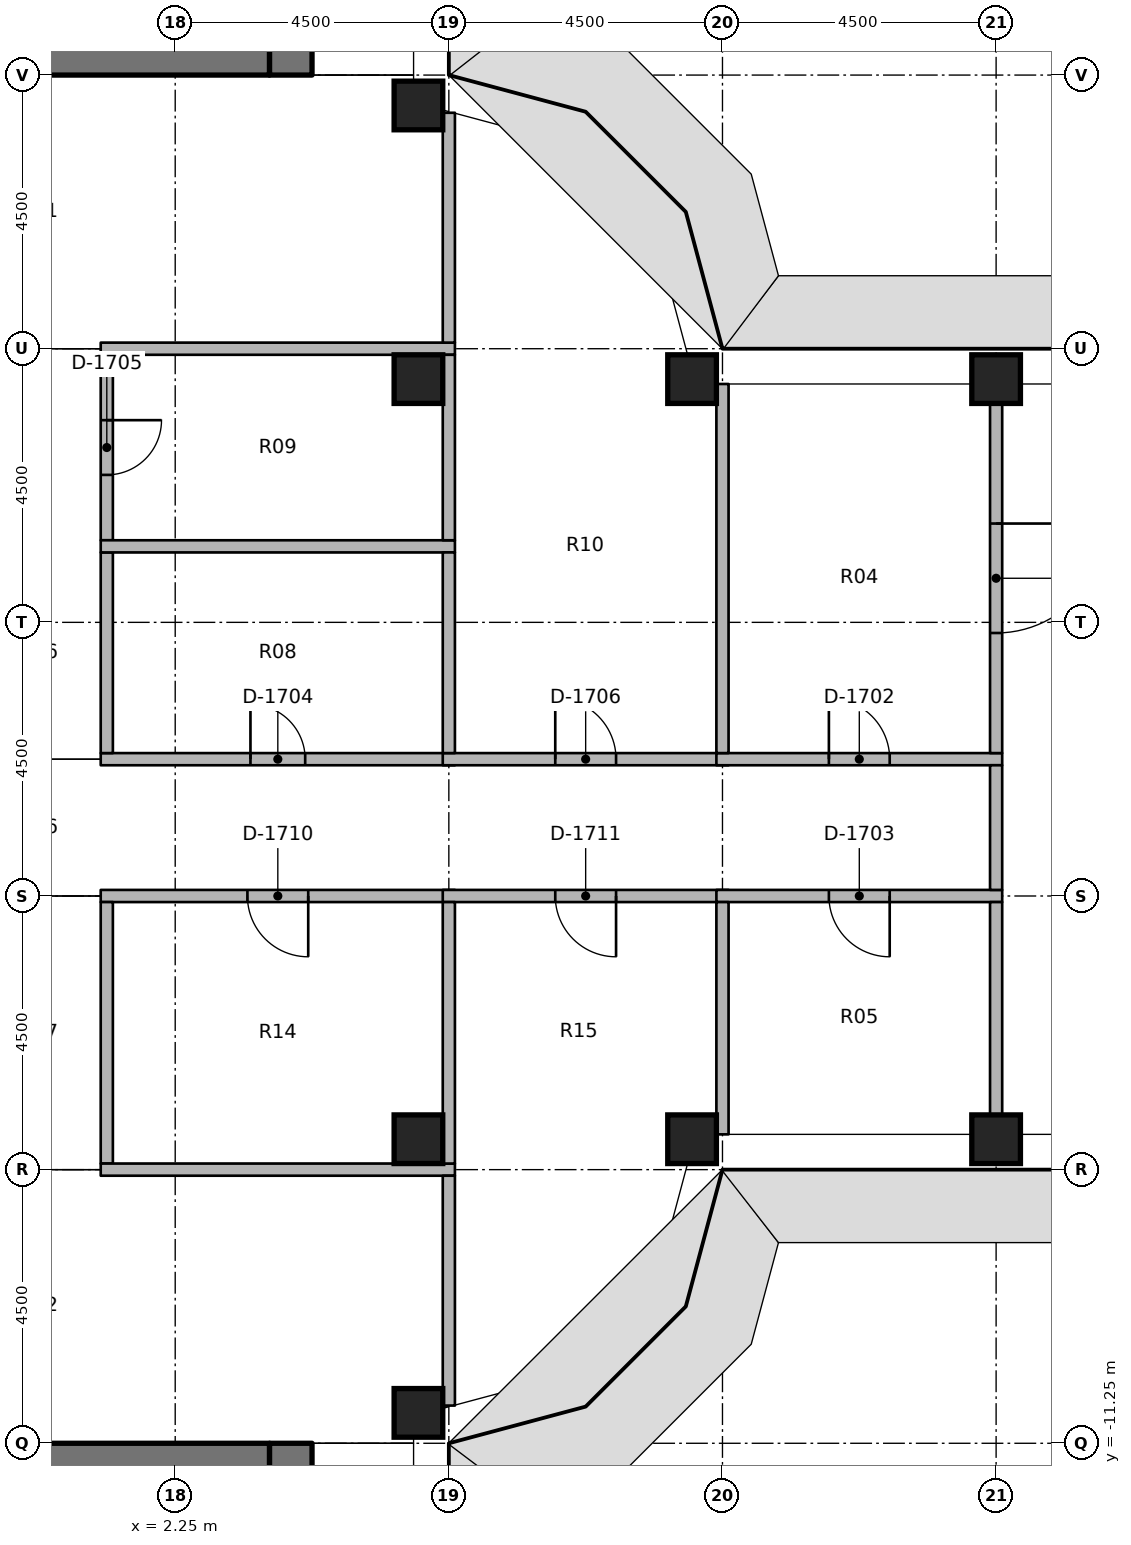
"""IFC4 building model, lengths in metres.
Left out: names, types, materials, properties, quantities, classifications, styles, units other than length and angle.
Written with IfcOpenShell. Run it as: python <this file> out.ifc"""

import sys

from ifc_helpers import new_model, si_unit, direction, frame, frame_2d, origin, origin_2d, place, context, subcontext, project, spatial, rectangle, extrude, element, fill, save


model = new_model("IFC4")
c1 = context("Model", 3, precision=1e-05, world=origin(), true_north=direction((0.0, 1.0)))
c2 = subcontext(c1, "Body", "Model", "MODEL_VIEW")
j1 = project(units=[si_unit("LENGTHUNIT", "METRE"), si_unit("PLANEANGLEUNIT", "RADIAN")], contexts=[c1])
p1 = place(None, origin())
s1 = spatial("IfcSite", under=j1, at=p1, CompositionType="ELEMENT")
p2 = place(p1, origin())
s2 = spatial("IfcBuilding", under=s1, at=p2, CompositionType="ELEMENT")
p3 = place(p2, frame((0.0, 0.0, 160.0)))
s3 = spatial("IfcBuildingStorey", under=s2, at=p3, CompositionType="ELEMENT", Elevation=160.0)
for number, where, z_axis, x_axis in (
    (1, (6.25, -10.75, 0.0), (0.0, 0.0, 1.0), (1.0, 0.0, 0.0)),
    (2, (6.25, -6.25, 0.0), (0.0, 0.0, 1.0), (1.0, 0.0, 0.0)),
    (3, (6.25, 6.25, 0.0), (0.0, 0.0, 1.0), (1.0, 0.0, 0.0)),
    (4, (6.25, 10.75, 0.0), (0.0, 0.0, 1.0), (1.0, 0.0, 0.0)),
    (5, (10.75, -6.25, 0.0), (0.0, 0.0, 1.0), (1.0, 0.0, 0.0)),
    (6, (10.75, 6.25, 0.0), (0.0, 0.0, 1.0), (1.0, 0.0, 0.0)),
    (7, (15.75, -6.25, 0.0), (0.0, 0.0, 1.0), (1.0, 0.0, 0.0)),
    (8, (15.75, 6.25, 0.0), (0.0, 0.0, 1.0), (1.0, 0.0, 0.0)),
):
    element("IfcColumn", number, at=place(p3, frame(where, z_axis=z_axis, x_axis=x_axis)), inside=s3, PredefinedType="COLUMN", context=c2, shape_type="SweptSolid", body=[
        extrude(rectangle(XDim=0.8, YDim=0.8, at=origin_2d()), origin(), (0.0, 0.0, 1.0), 3.65),
    ])
p4 = place(p3, frame((4.15, 11.25, 0.0), z_axis=(0.0, 0.0, 1.0), x_axis=(0.0, 1.0, 0.0)))
e9 = element("IfcWall", 9, at=p4, inside=s3, PredefinedType="SHEAR", context=c2, shape_type="SweptSolid", body=[
    extrude(rectangle(XDim=15.0, YDim=0.7, at=frame_2d((7.5, 0.0))), origin(), (0.0, 0.0, 1.0), 3.8),
])
p5 = place(p4, frame((7.15, 0.0, 0.0)))
e10 = element("IfcOpeningElement", 10, at=p5, cuts=e9, PredefinedType="OPENING", context=c2, shape_type="SweptSolid", body=[
    extrude(rectangle(XDim=1.5, YDim=2.3, at=frame_2d((0.75, 1.15))), frame((0.0, 0.36, 0.0), z_axis=(0.0, -1.0, 0.0), x_axis=(1.0, 0.0, 0.0)), (0.0, 0.0, 1.0), 0.72),
])
p6 = place(p4, frame((5.55, 0.0, 0.0)))
e11 = element("IfcOpeningElement", 11, at=p6, cuts=e9, PredefinedType="OPENING", context=c2, shape_type="SweptSolid", body=[
    extrude(rectangle(XDim=1.2, YDim=2.1, at=frame_2d((0.6, 1.05))), frame((0.0, 0.36, 0.0), z_axis=(0.0, -1.0, 0.0), x_axis=(1.0, 0.0, 0.0)), (0.0, 0.0, 1.0), 0.72),
])
p7 = place(p3, frame((-3.8, 11.6, 0.0), z_axis=(0.0, 0.0, 1.0), x_axis=(1.0, 0.0, 0.0)))
e12 = element("IfcWall", 12, at=p7, inside=s3, PredefinedType="SHEAR", context=c2, shape_type="SweptSolid", body=[
    extrude(rectangle(XDim=7.6, YDim=0.7, at=frame_2d((3.8, 0.0))), origin(), (0.0, 0.0, 1.0), 3.8),
])
p8 = place(p3, frame((4.15, -11.25, 0.0), z_axis=(0.0, 0.0, 1.0), x_axis=(0.0, -1.0, 0.0)))
e13 = element("IfcWall", 13, at=p8, inside=s3, PredefinedType="SHEAR", context=c2, shape_type="SweptSolid", body=[
    extrude(rectangle(XDim=15.0, YDim=0.7, at=frame_2d((7.5, 0.0))), origin(), (0.0, 0.0, 1.0), 3.8),
])
p9 = place(p8, frame((7.15, 0.0, 0.0)))
e14 = element("IfcOpeningElement", 14, at=p9, cuts=e13, PredefinedType="OPENING", context=c2, shape_type="SweptSolid", body=[
    extrude(rectangle(XDim=1.5, YDim=2.3, at=frame_2d((0.75, 1.15))), frame((0.0, 0.36, 0.0), z_axis=(0.0, -1.0, 0.0), x_axis=(1.0, 0.0, 0.0)), (0.0, 0.0, 1.0), 0.72),
])
p10 = place(p8, frame((13.9, 0.0, 0.0)))
e15 = element("IfcOpeningElement", 15, at=p10, cuts=e13, PredefinedType="OPENING", context=c2, shape_type="SweptSolid", body=[
    extrude(rectangle(XDim=0.9, YDim=2.1, at=frame_2d((0.45, 1.05))), frame((0.0, 0.36, 0.0), z_axis=(0.0, -1.0, 0.0), x_axis=(1.0, 0.0, 0.0)), (0.0, 0.0, 1.0), 0.72),
])
p11 = place(p8, frame((1.15, 0.0, 0.0)))
e16 = element("IfcOpeningElement", 16, at=p11, cuts=e13, PredefinedType="OPENING", context=c2, shape_type="SweptSolid", body=[
    extrude(rectangle(XDim=1.2, YDim=2.1, at=frame_2d((0.6, 1.05))), frame((0.0, 0.36, 0.0), z_axis=(0.0, -1.0, 0.0), x_axis=(1.0, 0.0, 0.0)), (0.0, 0.0, 1.0), 0.72),
])
p12 = place(p3, frame((-3.8, -11.6, 0.0), z_axis=(0.0, 0.0, 1.0), x_axis=(1.0, 0.0, 0.0)))
e17 = element("IfcWall", 17, at=p12, inside=s3, PredefinedType="SHEAR", context=c2, shape_type="SweptSolid", body=[
    extrude(rectangle(XDim=7.6, YDim=0.7, at=frame_2d((3.8, 0.0))), origin(), (0.0, 0.0, 1.0), 3.8),
])
p13 = place(p3, frame((1.025, 0.0, 0.0), z_axis=(0.0, 0.0, 1.0), x_axis=(1.0, 0.0, 0.0)))
e18 = element("IfcWall", 18, at=p13, inside=s3, PredefinedType="PARTITIONING", context=c2, shape_type="SweptSolid", body=[
    extrude(rectangle(XDim=5.825, YDim=0.2, at=frame_2d((2.913, 0.0))), origin(), (0.0, 0.0, 1.0), 2.75),
])
p14 = place(p13, frame((2.462, 0.0, 0.0)))
e19 = element("IfcOpeningElement", 19, at=p14, cuts=e18, PredefinedType="OPENING", context=c2, shape_type="SweptSolid", body=[
    extrude(rectangle(XDim=0.9, YDim=2.1, at=frame_2d((0.45, 1.05))), frame((0.0, 0.11, 0.0), z_axis=(0.0, -1.0, 0.0), x_axis=(1.0, 0.0, 0.0)), (0.0, 0.0, 1.0), 0.22),
])
p15 = place(p3, frame((6.65, 0.0, 0.0), z_axis=(0.0, 0.0, 1.0), x_axis=(1.0, 0.0, 0.0)))
e20 = element("IfcWall", 20, at=p15, inside=s3, PredefinedType="PARTITIONING", context=c2, shape_type="SweptSolid", body=[
    extrude(rectangle(XDim=4.7, YDim=0.2, at=frame_2d((2.35, 0.0))), origin(), (0.0, 0.0, 1.0), 2.75),
])
p16 = place(p15, frame((1.85, 0.0, 0.0)))
e21 = element("IfcOpeningElement", 21, at=p16, cuts=e20, PredefinedType="OPENING", context=c2, shape_type="SweptSolid", body=[
    extrude(rectangle(XDim=1.0, YDim=2.1, at=frame_2d((0.5, 1.05))), frame((0.0, 0.11, 0.0), z_axis=(0.0, -1.0, 0.0), x_axis=(1.0, 0.0, 0.0)), (0.0, 0.0, 1.0), 0.22),
])
p17 = place(p3, frame((6.85, -2.25, 0.0), z_axis=(0.0, 0.0, 1.0), x_axis=(-1.0, 0.0, 0.0)))
e22 = element("IfcWall", 22, at=p17, inside=s3, PredefinedType="PARTITIONING", context=c2, shape_type="SweptSolid", body=[
    extrude(rectangle(XDim=5.825, YDim=0.2, at=frame_2d((2.913, 0.0))), origin(), (0.0, 0.0, 1.0), 2.75),
])
p18 = place(p17, frame((2.413, 0.0, 0.0)))
e23 = element("IfcOpeningElement", 23, at=p18, cuts=e22, PredefinedType="OPENING", context=c2, shape_type="SweptSolid", body=[
    extrude(rectangle(XDim=1.0, YDim=2.1, at=frame_2d((0.5, 1.05))), frame((0.0, 0.11, 0.0), z_axis=(0.0, -1.0, 0.0), x_axis=(1.0, 0.0, 0.0)), (0.0, 0.0, 1.0), 0.22),
])
p19 = place(p3, frame((11.35, -2.25, 0.0), z_axis=(0.0, 0.0, 1.0), x_axis=(-1.0, 0.0, 0.0)))
e24 = element("IfcWall", 24, at=p19, inside=s3, PredefinedType="PARTITIONING", context=c2, shape_type="SweptSolid", body=[
    extrude(rectangle(XDim=4.7, YDim=0.2, at=frame_2d((2.35, 0.0))), origin(), (0.0, 0.0, 1.0), 2.75),
])
p20 = place(p19, frame((1.85, 0.0, 0.0)))
e25 = element("IfcOpeningElement", 25, at=p20, cuts=e24, PredefinedType="OPENING", context=c2, shape_type="SweptSolid", body=[
    extrude(rectangle(XDim=1.0, YDim=2.1, at=frame_2d((0.5, 1.05))), frame((0.0, 0.11, 0.0), z_axis=(0.0, -1.0, 0.0), x_axis=(1.0, 0.0, 0.0)), (0.0, 0.0, 1.0), 0.22),
])
p21 = place(p3, frame((11.15, 0.0, 0.0), z_axis=(0.0, 0.0, 1.0), x_axis=(1.0, 0.0, 0.0)))
e26 = element("IfcWall", 26, at=p21, inside=s3, PredefinedType="PARTITIONING", context=c2, shape_type="SweptSolid", body=[
    extrude(rectangle(XDim=4.7, YDim=0.2, at=frame_2d((2.35, 0.0))), origin(), (0.0, 0.0, 1.0), 2.75),
])
p22 = place(p21, frame((1.85, 0.0, 0.0)))
e27 = element("IfcOpeningElement", 27, at=p22, cuts=e26, PredefinedType="OPENING", context=c2, shape_type="SweptSolid", body=[
    extrude(rectangle(XDim=1.0, YDim=2.1, at=frame_2d((0.5, 1.05))), frame((0.0, 0.11, 0.0), z_axis=(0.0, -1.0, 0.0), x_axis=(1.0, 0.0, 0.0)), (0.0, 0.0, 1.0), 0.22),
])
p23 = place(p3, frame((15.85, -2.25, 0.0), z_axis=(0.0, 0.0, 1.0), x_axis=(-1.0, 0.0, 0.0)))
e28 = element("IfcWall", 28, at=p23, inside=s3, PredefinedType="PARTITIONING", context=c2, shape_type="SweptSolid", body=[
    extrude(rectangle(XDim=4.7, YDim=0.2, at=frame_2d((2.35, 0.0))), origin(), (0.0, 0.0, 1.0), 2.75),
])
p24 = place(p23, frame((1.85, 0.0, 0.0)))
e29 = element("IfcOpeningElement", 29, at=p24, cuts=e28, PredefinedType="OPENING", context=c2, shape_type="SweptSolid", body=[
    extrude(rectangle(XDim=1.0, YDim=2.1, at=frame_2d((0.5, 1.05))), frame((0.0, 0.11, 0.0), z_axis=(0.0, -1.0, 0.0), x_axis=(1.0, 0.0, 0.0)), (0.0, 0.0, 1.0), 0.22),
])
p25 = place(p3, frame((15.75, -2.15, 0.0), z_axis=(0.0, 0.0, 1.0), x_axis=(0.0, 1.0, 0.0)))
e30 = element("IfcWall", 30, at=p25, inside=s3, PredefinedType="PARTITIONING", context=c2, shape_type="SweptSolid", body=[
    extrude(rectangle(XDim=2.05, YDim=0.2, at=frame_2d((1.025, 0.0))), origin(), (0.0, 0.0, 1.0), 2.75),
])
p26 = place(p3, frame((1.125, 0.1, 0.0), z_axis=(0.0, 0.0, 1.0), x_axis=(0.0, 1.0, 0.0)))
e31 = element("IfcWall", 31, at=p26, inside=s3, PredefinedType="PARTITIONING", context=c2, shape_type="SweptSolid", body=[
    extrude(rectangle(XDim=3.3, YDim=0.2, at=frame_2d((1.65, 0.0))), origin(), (0.0, 0.0, 1.0), 2.75),
])
p27 = place(p3, frame((1.125, 6.65, 0.0), z_axis=(0.0, 0.0, 1.0), x_axis=(0.0, -1.0, 0.0)))
e32 = element("IfcWall", 32, at=p27, inside=s3, PredefinedType="PARTITIONING", context=c2, shape_type="SweptSolid", body=[
    extrude(rectangle(XDim=3.05, YDim=0.2, at=frame_2d((1.525, 0.0))), origin(), (0.0, 0.0, 1.0), 2.75),
])
p28 = place(p27, frame((1.075, 0.0, 0.0)))
e33 = element("IfcOpeningElement", 33, at=p28, cuts=e32, PredefinedType="OPENING", context=c2, shape_type="SweptSolid", body=[
    extrude(rectangle(XDim=0.9, YDim=2.1, at=frame_2d((0.45, 1.05))), frame((0.0, 0.11, 0.0), z_axis=(0.0, -1.0, 0.0), x_axis=(1.0, 0.0, 0.0)), (0.0, 0.0, 1.0), 0.22),
])
p29 = place(p3, frame((1.125, -6.65, 0.0), z_axis=(0.0, 0.0, 1.0), x_axis=(0.0, 1.0, 0.0)))
e34 = element("IfcWall", 34, at=p29, inside=s3, PredefinedType="PARTITIONING", context=c2, shape_type="SweptSolid", body=[
    extrude(rectangle(XDim=4.3, YDim=0.2, at=frame_2d((2.15, 0.0))), origin(), (0.0, 0.0, 1.0), 2.75),
])
p30 = place(p3, frame((1.025, 6.75, 0.0), z_axis=(0.0, 0.0, 1.0), x_axis=(1.0, 0.0, 0.0)))
e35 = element("IfcWall", 35, at=p30, inside=s3, PredefinedType="PARTITIONING", context=c2, shape_type="SweptSolid", body=[
    extrude(rectangle(XDim=5.825, YDim=0.2, at=frame_2d((2.913, 0.0))), origin(), (0.0, 0.0, 1.0), 2.75),
])
p31 = place(p3, frame((6.75, 6.85, 0.0), z_axis=(0.0, 0.0, 1.0), x_axis=(0.0, 1.0, 0.0)))
e36 = element("IfcWall", 36, at=p31, inside=s3, PredefinedType="PARTITIONING", context=c2, shape_type="SweptSolid", body=[
    extrude(rectangle(XDim=3.78, YDim=0.2, at=frame_2d((1.89, 0.0))), origin(), (0.0, 0.0, 1.0), 2.75),
])
p32 = place(p3, frame((1.025, -6.75, 0.0), z_axis=(0.0, 0.0, 1.0), x_axis=(1.0, 0.0, 0.0)))
e37 = element("IfcWall", 37, at=p32, inside=s3, PredefinedType="PARTITIONING", context=c2, shape_type="SweptSolid", body=[
    extrude(rectangle(XDim=5.825, YDim=0.2, at=frame_2d((2.913, 0.0))), origin(), (0.0, 0.0, 1.0), 2.75),
])
p33 = place(p3, frame((6.75, -10.63, 0.0), z_axis=(0.0, 0.0, 1.0), x_axis=(0.0, 1.0, 0.0)))
e38 = element("IfcWall", 38, at=p33, inside=s3, PredefinedType="PARTITIONING", context=c2, shape_type="SweptSolid", body=[
    extrude(rectangle(XDim=3.78, YDim=0.2, at=frame_2d((1.89, 0.0))), origin(), (0.0, 0.0, 1.0), 2.75),
])
p34 = place(p3, frame((1.025, 3.5, 0.0), z_axis=(0.0, 0.0, 1.0), x_axis=(1.0, 0.0, 0.0)))
e39 = element("IfcWall", 39, at=p34, inside=s3, PredefinedType="PARTITIONING", context=c2, shape_type="SweptSolid", body=[
    extrude(rectangle(XDim=5.825, YDim=0.2, at=frame_2d((2.913, 0.0))), origin(), (0.0, 0.0, 1.0), 2.75),
])
p35 = place(p3, frame((6.75, 0.1, 0.0), z_axis=(0.0, 0.0, 1.0), x_axis=(0.0, 1.0, 0.0)))
e40 = element("IfcWall", 40, at=p35, inside=s3, PredefinedType="PARTITIONING", context=c2, shape_type="SweptSolid", body=[
    extrude(rectangle(XDim=3.3, YDim=0.2, at=frame_2d((1.65, 0.0))), origin(), (0.0, 0.0, 1.0), 2.75),
])
p36 = place(p3, frame((6.75, 3.6, 0.0), z_axis=(0.0, 0.0, 1.0), x_axis=(0.0, 1.0, 0.0)))
e41 = element("IfcWall", 41, at=p36, inside=s3, PredefinedType="PARTITIONING", context=c2, shape_type="SweptSolid", body=[
    extrude(rectangle(XDim=3.05, YDim=0.2, at=frame_2d((1.525, 0.0))), origin(), (0.0, 0.0, 1.0), 2.75),
])
p37 = place(p3, frame((11.25, 0.1, 0.0), z_axis=(0.0, 0.0, 1.0), x_axis=(0.0, 1.0, 0.0)))
e42 = element("IfcWall", 42, at=p37, inside=s3, PredefinedType="PARTITIONING", context=c2, shape_type="SweptSolid", body=[
    extrude(rectangle(XDim=6.07, YDim=0.2, at=frame_2d((3.035, 0.0))), origin(), (0.0, 0.0, 1.0), 2.75),
])
p38 = place(p3, frame((6.75, -6.65, 0.0), z_axis=(0.0, 0.0, 1.0), x_axis=(0.0, 1.0, 0.0)))
e43 = element("IfcWall", 43, at=p38, inside=s3, PredefinedType="PARTITIONING", context=c2, shape_type="SweptSolid", body=[
    extrude(rectangle(XDim=4.3, YDim=0.2, at=frame_2d((2.15, 0.0))), origin(), (0.0, 0.0, 1.0), 2.75),
])
p39 = place(p3, frame((11.25, -6.17, 0.0), z_axis=(0.0, 0.0, 1.0), x_axis=(0.0, 1.0, 0.0)))
e44 = element("IfcWall", 44, at=p39, inside=s3, PredefinedType="PARTITIONING", context=c2, shape_type="SweptSolid", body=[
    extrude(rectangle(XDim=3.82, YDim=0.2, at=frame_2d((1.91, 0.0))), origin(), (0.0, 0.0, 1.0), 2.75),
])
p40 = place(p3, frame((15.75, 5.85, 0.0), z_axis=(0.0, 0.0, 1.0), x_axis=(0.0, -1.0, 0.0)))
e45 = element("IfcWall", 45, at=p40, inside=s3, PredefinedType="PARTITIONING", context=c2, shape_type="SweptSolid", body=[
    extrude(rectangle(XDim=5.75, YDim=0.2, at=frame_2d((2.875, 0.0))), origin(), (0.0, 0.0, 1.0), 2.75),
])
p41 = place(p40, frame((1.975, 0.0, 0.0)))
e46 = element("IfcOpeningElement", 46, at=p41, cuts=e45, PredefinedType="OPENING", context=c2, shape_type="SweptSolid", body=[
    extrude(rectangle(XDim=1.8, YDim=2.1, at=frame_2d((0.9, 1.05))), frame((0.0, 0.11, 0.0), z_axis=(0.0, -1.0, 0.0), x_axis=(1.0, 0.0, 0.0)), (0.0, 0.0, 1.0), 0.22),
])
p42 = place(p3, frame((15.75, -5.85, 0.0), z_axis=(0.0, 0.0, 1.0), x_axis=(0.0, 1.0, 0.0)))
e47 = element("IfcWall", 47, at=p42, inside=s3, PredefinedType="PARTITIONING", context=c2, shape_type="SweptSolid", body=[
    extrude(rectangle(XDim=3.5, YDim=0.2, at=frame_2d((1.75, 0.0))), origin(), (0.0, 0.0, 1.0), 2.75),
])
p43 = place(p41, origin())
e48 = element("IfcDoor", 48, at=p43, inside=s3, OperationType="DOUBLE_DOOR_SINGLE_SWING", PredefinedType="DOOR", context=c2, shape_type="SweptSolid", body=[
    extrude(rectangle(XDim=1.8, YDim=2.1, at=frame_2d((0.9, 1.05))), frame((0.0, 0.025, 0.0), z_axis=(0.0, -1.0, 0.0), x_axis=(1.0, 0.0, 0.0)), (0.0, 0.0, 1.0), 0.05),
])
fill(e46, e48)
p44 = place(p22, origin())
e49 = element("IfcDoor", 49, at=p44, inside=s3, OperationType="SINGLE_SWING_RIGHT", PredefinedType="DOOR", context=c2, shape_type="SweptSolid", body=[
    extrude(rectangle(XDim=1.0, YDim=2.1, at=frame_2d((0.5, 1.05))), frame((0.0, 0.025, 0.0), z_axis=(0.0, -1.0, 0.0), x_axis=(1.0, 0.0, 0.0)), (0.0, 0.0, 1.0), 0.05),
])
fill(e27, e49)
p45 = place(p24, origin())
e50 = element("IfcDoor", 50, at=p45, inside=s3, OperationType="SINGLE_SWING_RIGHT", PredefinedType="DOOR", context=c2, shape_type="SweptSolid", body=[
    extrude(rectangle(XDim=1.0, YDim=2.1, at=frame_2d((0.5, 1.05))), frame((0.0, 0.025, 0.0), z_axis=(0.0, -1.0, 0.0), x_axis=(1.0, 0.0, 0.0)), (0.0, 0.0, 1.0), 0.05),
])
fill(e29, e50)
p46 = place(p14, origin())
e51 = element("IfcDoor", 51, at=p46, inside=s3, OperationType="SINGLE_SWING_RIGHT", PredefinedType="DOOR", context=c2, shape_type="SweptSolid", body=[
    extrude(rectangle(XDim=0.9, YDim=2.1, at=frame_2d((0.45, 1.05))), frame((0.0, 0.025, 0.0), z_axis=(0.0, -1.0, 0.0), x_axis=(1.0, 0.0, 0.0)), (0.0, 0.0, 1.0), 0.05),
])
fill(e19, e51)
p47 = place(p28, origin())
e52 = element("IfcDoor", 52, at=p47, inside=s3, OperationType="SINGLE_SWING_RIGHT", PredefinedType="DOOR", context=c2, shape_type="SweptSolid", body=[
    extrude(rectangle(XDim=0.9, YDim=2.1, at=frame_2d((0.45, 1.05))), frame((0.0, 0.025, 0.0), z_axis=(0.0, -1.0, 0.0), x_axis=(1.0, 0.0, 0.0)), (0.0, 0.0, 1.0), 0.05),
])
fill(e33, e52)
p48 = place(p16, origin())
e53 = element("IfcDoor", 53, at=p48, inside=s3, OperationType="SINGLE_SWING_RIGHT", PredefinedType="DOOR", context=c2, shape_type="SweptSolid", body=[
    extrude(rectangle(XDim=1.0, YDim=2.1, at=frame_2d((0.5, 1.05))), frame((0.0, 0.025, 0.0), z_axis=(0.0, -1.0, 0.0), x_axis=(1.0, 0.0, 0.0)), (0.0, 0.0, 1.0), 0.05),
])
fill(e21, e53)
p49 = place(p18, origin())
e54 = element("IfcDoor", 54, at=p49, inside=s3, OperationType="SINGLE_SWING_RIGHT", PredefinedType="DOOR", context=c2, shape_type="SweptSolid", body=[
    extrude(rectangle(XDim=1.0, YDim=2.1, at=frame_2d((0.5, 1.05))), frame((0.0, 0.025, 0.0), z_axis=(0.0, -1.0, 0.0), x_axis=(1.0, 0.0, 0.0)), (0.0, 0.0, 1.0), 0.05),
])
fill(e23, e54)
p50 = place(p20, origin())
e55 = element("IfcDoor", 55, at=p50, inside=s3, OperationType="SINGLE_SWING_RIGHT", PredefinedType="DOOR", context=c2, shape_type="SweptSolid", body=[
    extrude(rectangle(XDim=1.0, YDim=2.1, at=frame_2d((0.5, 1.05))), frame((0.0, 0.025, 0.0), z_axis=(0.0, -1.0, 0.0), x_axis=(1.0, 0.0, 0.0)), (0.0, 0.0, 1.0), 0.05),
])
fill(e25, e55)
save(model, sys.argv[1])
